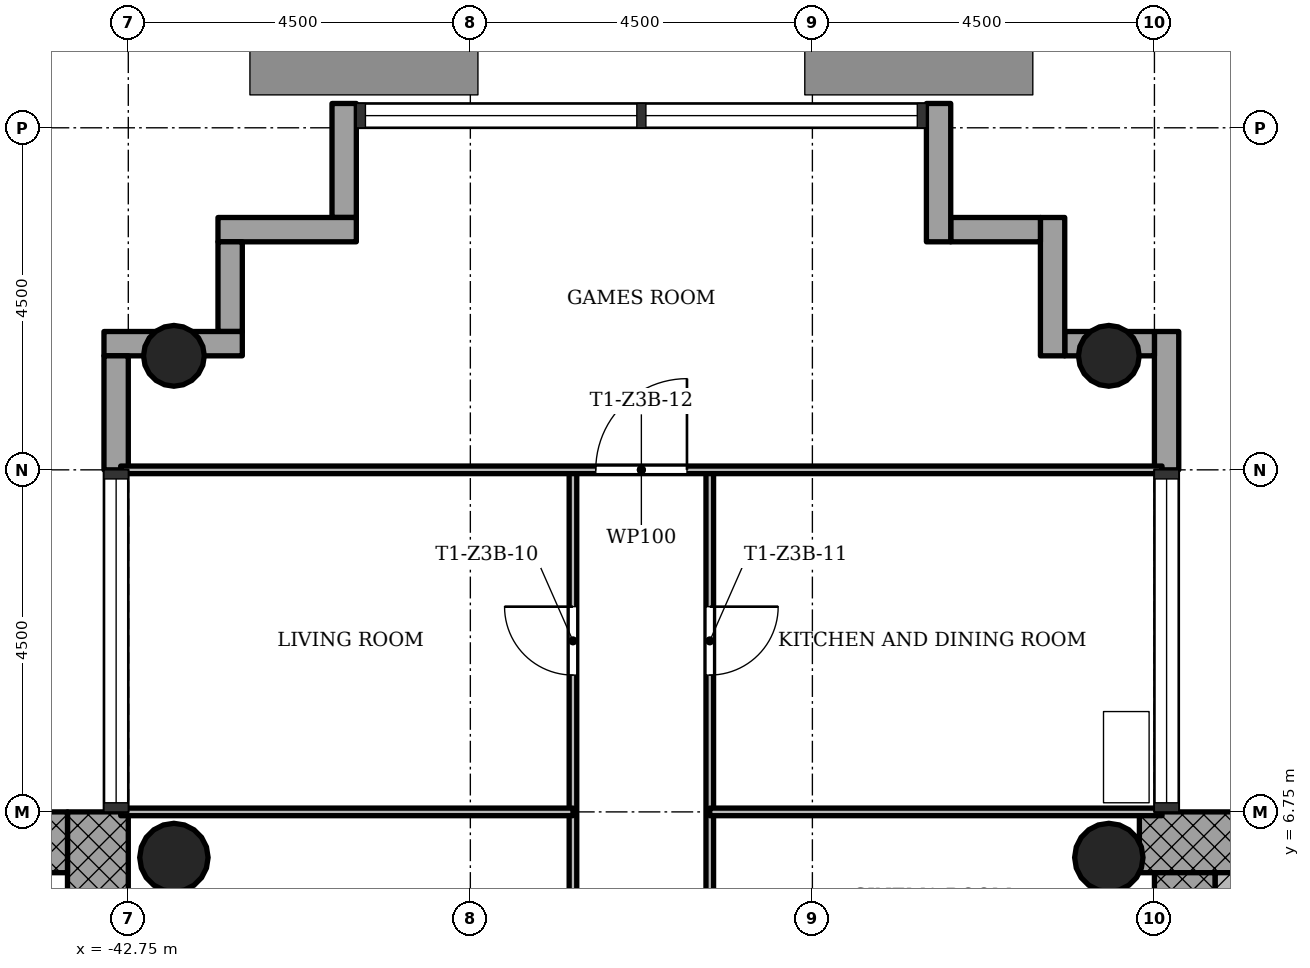
"""IFC4 building model, lengths in metres.
Left out: names, types, materials, properties, quantities, classifications, styles, units other than length and angle.
Written with IfcOpenShell. Run it as: python <this file> out.ifc"""

import sys

from ifc_helpers import new_model, si_unit, direction, frame, frame_2d, origin, origin_2d, place, context, subcontext, project, spatial, rectangle, hollow_circle, extrude, element, fill, save


model = new_model("IFC4")
c1 = context("Model", 3, precision=1e-05, world=origin(), true_north=direction((0.0, 1.0)))
c2 = subcontext(c1, "Body", "Model", "MODEL_VIEW")
j1 = project(units=[si_unit("LENGTHUNIT", "METRE"), si_unit("PLANEANGLEUNIT", "RADIAN")], contexts=[c1])
p1 = place(None, origin())
s1 = spatial("IfcSite", under=j1, at=p1, CompositionType="ELEMENT")
p2 = place(p1, origin())
s2 = spatial("IfcBuilding", under=s1, at=p2, CompositionType="ELEMENT")
p3 = place(p2, frame((0.0, 0.0, 150.7)))
s3 = spatial("IfcBuildingStorey", under=s2, at=p3, CompositionType="ELEMENT", Elevation=150.7)
p4 = place(p3, frame((-20.652, 6.35, 0.0), z_axis=(0.0, 0.0, 1.0), x_axis=(-1.0, 0.0, 0.0)))
e1 = element("IfcWall", 1, at=p4, inside=s3, PredefinedType="SHEAR", context=c2, shape_type="SweptSolid", body=[
    extrude(rectangle(XDim=8.796, YDim=0.8, at=frame_2d((4.398, 0.0))), origin(), (0.0, 0.0, 1.0), 3.4),
])
p5 = place(p3, frame((-28.85, 5.95, 0.0), z_axis=(0.0, 0.0, 1.0), x_axis=(0.0, -1.0, 0.0)))
e2 = element("IfcWall", 2, at=p5, inside=s3, PredefinedType="SHEAR", context=c2, shape_type="SweptSolid", body=[
    extrude(rectangle(XDim=12.7, YDim=0.8, at=frame_2d((6.35, 0.0))), origin(), (0.0, 0.0, 1.0), 3.4),
])
p6 = place(p5, frame((5.05, 0.0, 0.0)))
e3 = element("IfcOpeningElement", 3, at=p6, cuts=e2, PredefinedType="OPENING", context=c2, shape_type="SweptSolid", body=[
    extrude(rectangle(XDim=1.8, YDim=2.1, at=frame_2d((0.9, 1.05))), frame((0.0, 0.41, 0.0), z_axis=(0.0, -1.0, 0.0), x_axis=(1.0, 0.0, 0.0)), (0.0, 0.0, 1.0), 0.82),
])
p7 = place(p3, frame((-43.15, -5.95, 0.0), z_axis=(0.0, 0.0, 1.0), x_axis=(0.0, 1.0, 0.0)))
e4 = element("IfcWall", 4, at=p7, inside=s3, PredefinedType="SHEAR", context=c2, shape_type="SweptSolid", body=[
    extrude(rectangle(XDim=12.7, YDim=0.8, at=frame_2d((6.35, 0.0))), origin(), (0.0, 0.0, 1.0), 3.4),
])
p8 = place(p7, frame((5.05, 0.0, 0.0)))
e5 = element("IfcOpeningElement", 5, at=p8, cuts=e4, PredefinedType="OPENING", context=c2, shape_type="SweptSolid", body=[
    extrude(rectangle(XDim=1.8, YDim=2.1, at=frame_2d((0.9, 1.05))), frame((0.0, 0.41, 0.0), z_axis=(0.0, -1.0, 0.0), x_axis=(1.0, 0.0, 0.0)), (0.0, 0.0, 1.0), 0.82),
])
p9 = place(p3, frame((-43.55, 6.35, 0.0), z_axis=(0.0, 0.0, 1.0), x_axis=(-1.0, 0.0, 0.0)))
e6 = element("IfcWall", 6, at=p9, inside=s3, PredefinedType="SHEAR", context=c2, shape_type="SweptSolid", body=[
    extrude(rectangle(XDim=8.2, YDim=0.8, at=frame_2d((4.1, 0.0))), origin(), (0.0, 0.0, 1.0), 3.4),
])
for number, where, z_axis, x_axis in (
    (7, (-29.85, 12.75, 0.0), (0.0, 0.0, 1.0), (1.0, 0.0, 0.0)),
    (8, (-42.15, 12.75, 0.0), (0.0, 0.0, 1.0), (1.0, 0.0, 0.0)),
):
    element("IfcColumn", number, at=place(p3, frame(where, z_axis=z_axis, x_axis=x_axis)), inside=s3, PredefinedType="COLUMN", context=c2, shape_type="SweptSolid", body=[
        extrude(hollow_circle(Radius=0.4, WallThickness=0.028, at=origin_2d()), origin(), (0.0, 0.0, 1.0), 3.4),
    ])
for number, where, z_axis, x_axis in (
    (9, (-29.85, 6.15, 0.0), (0.0, 0.0, 1.0), (1.0, 0.0, 0.0)),
    (10, (-42.15, 6.15, 0.0), (0.0, 0.0, 1.0), (1.0, 0.0, 0.0)),
):
    element("IfcColumn", number, at=place(p3, frame(where, z_axis=z_axis, x_axis=x_axis)), inside=s3, PredefinedType="COLUMN", context=c2, shape_type="SweptSolid", body=[
        extrude(hollow_circle(Radius=0.45, WallThickness=0.032, at=origin_2d()), origin(), (0.0, 0.0, 1.0), 3.4),
    ])
p10 = place(p3, frame((-29.09, 11.25, -0.3), z_axis=(0.0, 0.0, 1.0), x_axis=(0.0, 1.0, 0.0)))
e11 = element("IfcWall", 11, at=p10, inside=s3, PredefinedType="STANDARD", context=c2, shape_type="SweptSolid", body=[
    extrude(rectangle(XDim=1.82, YDim=0.32, at=frame_2d((0.91, 0.0))), origin(), (0.0, 0.0, 1.0), 3.4),
])
p11 = place(p3, frame((-29.25, 12.91, -0.3), z_axis=(0.0, 0.0, 1.0), x_axis=(-1.0, 0.0, 0.0)))
e12 = element("IfcWall", 12, at=p11, inside=s3, PredefinedType="STANDARD", context=c2, shape_type="SweptSolid", body=[
    extrude(rectangle(XDim=1.18, YDim=0.32, at=frame_2d((0.59, 0.0))), origin(), (0.0, 0.0, 1.0), 3.4),
])
p12 = place(p3, frame((-30.59, 12.75, -0.3), z_axis=(0.0, 0.0, 1.0), x_axis=(0.0, 1.0, 0.0)))
e13 = element("IfcWall", 13, at=p12, inside=s3, PredefinedType="STANDARD", context=c2, shape_type="SweptSolid", body=[
    extrude(rectangle(XDim=1.82, YDim=0.32, at=frame_2d((0.91, 0.0))), origin(), (0.0, 0.0, 1.0), 3.4),
])
p13 = place(p3, frame((-30.75, 14.41, -0.3), z_axis=(0.0, 0.0, 1.0), x_axis=(-1.0, 0.0, 0.0)))
e14 = element("IfcWall", 14, at=p13, inside=s3, PredefinedType="STANDARD", context=c2, shape_type="SweptSolid", body=[
    extrude(rectangle(XDim=1.18, YDim=0.32, at=frame_2d((0.59, 0.0))), origin(), (0.0, 0.0, 1.0), 3.4),
])
p14 = place(p3, frame((-32.09, 14.25, -0.3), z_axis=(0.0, 0.0, 1.0), x_axis=(0.0, 1.0, 0.0)))
e15 = element("IfcWall", 15, at=p14, inside=s3, PredefinedType="STANDARD", context=c2, shape_type="SweptSolid", body=[
    extrude(rectangle(XDim=1.82, YDim=0.32, at=frame_2d((0.91, 0.0))), origin(), (0.0, 0.0, 1.0), 3.4),
])
p15 = place(p3, frame((-39.91, 16.07, -0.3), z_axis=(0.0, 0.0, 1.0), x_axis=(0.0, -1.0, 0.0)))
e16 = element("IfcWall", 16, at=p15, inside=s3, PredefinedType="STANDARD", context=c2, shape_type="SweptSolid", body=[
    extrude(rectangle(XDim=1.5, YDim=0.32, at=frame_2d((0.75, 0.0))), origin(), (0.0, 0.0, 1.0), 3.4),
])
p16 = place(p3, frame((-39.75, 14.41, -0.3), z_axis=(0.0, 0.0, 1.0), x_axis=(-1.0, 0.0, 0.0)))
e17 = element("IfcWall", 17, at=p16, inside=s3, PredefinedType="STANDARD", context=c2, shape_type="SweptSolid", body=[
    extrude(rectangle(XDim=1.82, YDim=0.32, at=frame_2d((0.91, 0.0))), origin(), (0.0, 0.0, 1.0), 3.4),
])
p17 = place(p3, frame((-41.41, 14.25, -0.3), z_axis=(0.0, 0.0, 1.0), x_axis=(0.0, -1.0, 0.0)))
e18 = element("IfcWall", 18, at=p17, inside=s3, PredefinedType="STANDARD", context=c2, shape_type="SweptSolid", body=[
    extrude(rectangle(XDim=1.18, YDim=0.32, at=frame_2d((0.59, 0.0))), origin(), (0.0, 0.0, 1.0), 3.4),
])
p18 = place(p3, frame((-41.25, 12.91, -0.3), z_axis=(0.0, 0.0, 1.0), x_axis=(-1.0, 0.0, 0.0)))
e19 = element("IfcWall", 19, at=p18, inside=s3, PredefinedType="STANDARD", context=c2, shape_type="SweptSolid", body=[
    extrude(rectangle(XDim=1.82, YDim=0.32, at=frame_2d((0.91, 0.0))), origin(), (0.0, 0.0, 1.0), 3.4),
])
p19 = place(p3, frame((-42.91, 12.75, -0.3), z_axis=(0.0, 0.0, 1.0), x_axis=(0.0, -1.0, 0.0)))
e20 = element("IfcWall", 20, at=p19, inside=s3, PredefinedType="STANDARD", context=c2, shape_type="SweptSolid", body=[
    extrude(rectangle(XDim=1.5, YDim=0.32, at=frame_2d((0.75, 0.0))), origin(), (0.0, 0.0, 1.0), 3.4),
])
p20 = place(p3, frame((-36.9, 4.5, 0.0), z_axis=(0.0, 0.0, 1.0), x_axis=(0.0, 1.0, 0.0)))
e21 = element("IfcWall", 21, at=p20, inside=s3, PredefinedType="PARTITIONING", context=c2, shape_type="SweptSolid", body=[
    extrude(rectangle(XDim=6.75, YDim=0.1, at=frame_2d((3.375, 0.0))), origin(), (0.0, 0.0, 1.0), 3.0),
])
p21 = place(p20, frame((4.05, 0.0, 0.0)))
e22 = element("IfcOpeningElement", 22, at=p21, cuts=e21, PredefinedType="OPENING", context=c2, shape_type="SweptSolid", body=[
    extrude(rectangle(XDim=0.9, YDim=2.1, at=frame_2d((0.45, 1.05))), frame((0.0, 0.06, 0.0), z_axis=(0.0, -1.0, 0.0), x_axis=(1.0, 0.0, 0.0)), (0.0, 0.0, 1.0), 0.12),
])
p22 = place(p3, frame((-35.1, 4.5, 0.0), z_axis=(0.0, 0.0, 1.0), x_axis=(0.0, 1.0, 0.0)))
e23 = element("IfcWall", 23, at=p22, inside=s3, PredefinedType="PARTITIONING", context=c2, shape_type="SweptSolid", body=[
    extrude(rectangle(XDim=6.75, YDim=0.1, at=frame_2d((3.375, 0.0))), origin(), (0.0, 0.0, 1.0), 3.0),
])
p23 = place(p22, frame((4.05, 0.0, 0.0)))
e24 = element("IfcOpeningElement", 24, at=p23, cuts=e23, PredefinedType="OPENING", context=c2, shape_type="SweptSolid", body=[
    extrude(rectangle(XDim=0.9, YDim=2.1, at=frame_2d((0.45, 1.05))), frame((0.0, 0.06, 0.0), z_axis=(0.0, -1.0, 0.0), x_axis=(1.0, 0.0, 0.0)), (0.0, 0.0, 1.0), 0.12),
])
for number, where, z_axis, x_axis in (
    (25, (-42.85, 6.75, 0.0), (0.0, 0.0, 1.0), (1.0, 0.0, 0.0)),
    (26, (-35.1, 6.75, 0.0), (0.0, 0.0, 1.0), (1.0, 0.0, 0.0)),
):
    element("IfcWall", number, at=place(p3, frame(where, z_axis=z_axis, x_axis=x_axis)), inside=s3, PredefinedType="PARTITIONING", context=c2, shape_type="SweptSolid", body=[
        extrude(rectangle(XDim=5.95, YDim=0.1, at=frame_2d((2.975, 0.0))), origin(), (0.0, 0.0, 1.0), 3.0),
    ])
p24 = place(p3, frame((-42.85, 11.25, 0.0), z_axis=(0.0, 0.0, 1.0), x_axis=(1.0, 0.0, 0.0)))
e27 = element("IfcWall", 27, at=p24, inside=s3, PredefinedType="PARTITIONING", context=c2, shape_type="SweptSolid", body=[
    extrude(rectangle(XDim=13.7, YDim=0.1, at=frame_2d((6.85, 0.0))), origin(), (0.0, 0.0, 1.0), 3.0),
])
p25 = place(p24, frame((6.25, 0.0, 0.0)))
e28 = element("IfcOpeningElement", 28, at=p25, cuts=e27, PredefinedType="OPENING", context=c2, shape_type="SweptSolid", body=[
    extrude(rectangle(XDim=1.2, YDim=2.1, at=frame_2d((0.6, 1.05))), frame((0.0, 0.06, 0.0), z_axis=(0.0, -1.0, 0.0), x_axis=(1.0, 0.0, 0.0)), (0.0, 0.0, 1.0), 0.12),
])
p26 = place(p3, frame((-28.25, 1.85, 0.0), z_axis=(0.0, 0.0, 1.0), x_axis=(0.0, 1.0, 0.0)))
e29 = element("IfcWall", 29, at=p26, inside=s3, PredefinedType="SHEAR", context=c2, shape_type="SweptSolid", body=[
    extrude(rectangle(XDim=4.1, YDim=0.4, at=frame_2d((2.05, 0.0))), origin(), (0.0, 0.0, 1.0), 3.4),
])
p27 = place(p21, origin())
e30 = element("IfcDoor", 30, at=p27, inside=s3, OperationType="SINGLE_SWING_LEFT", PredefinedType="DOOR", context=c2, shape_type="SweptSolid", body=[
    extrude(rectangle(XDim=0.9, YDim=2.1, at=frame_2d((0.45, 1.05))), frame((0.0, 0.025, 0.0), z_axis=(0.0, -1.0, 0.0), x_axis=(1.0, 0.0, 0.0)), (0.0, 0.0, 1.0), 0.05),
])
fill(e22, e30)
p28 = place(p23, origin())
e31 = element("IfcDoor", 31, at=p28, inside=s3, OperationType="SINGLE_SWING_RIGHT", PredefinedType="DOOR", context=c2, shape_type="SweptSolid", body=[
    extrude(rectangle(XDim=0.9, YDim=2.1, at=frame_2d((0.45, 1.05))), frame((0.0, 0.025, 0.0), z_axis=(0.0, -1.0, 0.0), x_axis=(1.0, 0.0, 0.0)), (0.0, 0.0, 1.0), 0.05),
])
fill(e24, e31)
p29 = place(p25, origin())
e32 = element("IfcDoor", 32, at=p29, inside=s3, OperationType="SINGLE_SWING_LEFT", PredefinedType="DOOR", context=c2, shape_type="SweptSolid", body=[
    extrude(rectangle(XDim=1.2, YDim=2.1, at=frame_2d((0.6, 1.05))), frame((0.0, 0.025, 0.0), z_axis=(0.0, -1.0, 0.0), x_axis=(1.0, 0.0, 0.0)), (0.0, 0.0, 1.0), 0.05),
])
fill(e28, e32)
save(model, sys.argv[1])
